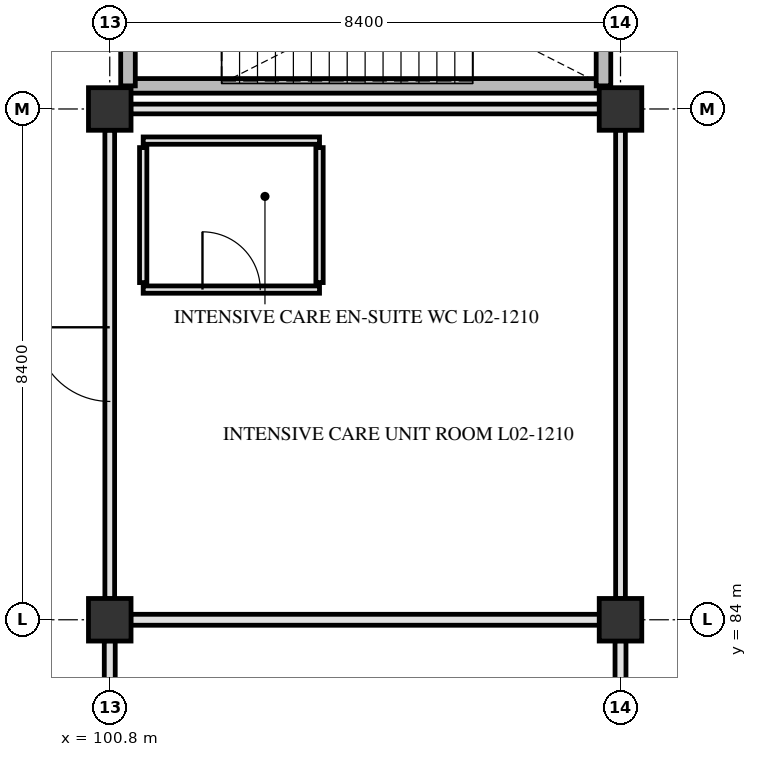
"""IFC4 building model, lengths in metres.
Left out: names, types, materials, properties, quantities, classifications, styles, units other than length and angle.
Written with IfcOpenShell. Run it as: python <this file> out.ifc"""

import sys

from ifc_helpers import new_model, si_unit, direction, frame, frame_2d, origin, origin_2d, place, context, subcontext, project, spatial, rectangle, extrude, element, fill, save


model = new_model("IFC4")
c1 = context("Model", 3, precision=1e-05, world=origin(), true_north=direction((0.0, 1.0)))
c2 = subcontext(c1, "Body", "Model", "MODEL_VIEW")
j1 = project(units=[si_unit("LENGTHUNIT", "METRE"), si_unit("PLANEANGLEUNIT", "RADIAN")], contexts=[c1])
p1 = place(None, origin())
s1 = spatial("IfcSite", under=j1, at=p1, CompositionType="ELEMENT")
p2 = place(p1, origin())
s2 = spatial("IfcBuilding", under=s1, at=p2, CompositionType="ELEMENT")
p3 = place(p2, frame((0.0, 0.0, 9.3)))
s3 = spatial("IfcBuildingStorey", under=s2, at=p3, CompositionType="ELEMENT", Elevation=9.3)
for number, where, z_axis, x_axis in (
    (1, (100.8, 84.0, 0.0), (0.0, 0.0, 1.0), (1.0, 0.0, 0.0)),
    (2, (100.8, 92.4, 0.0), (0.0, 0.0, 1.0), (1.0, 0.0, 0.0)),
    (3, (109.2, 84.0, 0.0), (0.0, 0.0, 1.0), (1.0, 0.0, 0.0)),
    (4, (109.2, 92.4, 0.0), (0.0, 0.0, 1.0), (1.0, 0.0, 0.0)),
):
    element("IfcColumn", number, at=place(p3, frame(where, z_axis=z_axis, x_axis=x_axis)), inside=s3, PredefinedType="COLUMN", context=c2, shape_type="SweptSolid", body=[
        extrude(rectangle(XDim=0.7, YDim=0.7, at=origin_2d()), origin(), (0.0, 0.0, 1.0), 5.1),
    ])
p4 = place(p3, frame((101.1, 92.78, 0.0), z_axis=(0.0, 0.0, 1.0), x_axis=(1.0, 0.0, 0.0)))
e5 = element("IfcWall", 5, at=p4, inside=s3, PredefinedType="SHEAR", context=c2, shape_type="SweptSolid", body=[
    extrude(rectangle(XDim=7.82, YDim=0.24, at=frame_2d((3.91, 0.0))), origin(), (0.0, 0.0, 1.0), 4.78),
])
for number, where, z_axis, x_axis in (
    (6, (101.1, 92.78, 0.0), (0.0, 0.0, 1.0), (0.0, 1.0, 0.0)),
    (7, (108.92, 92.78, 0.0), (0.0, 0.0, 1.0), (0.0, 1.0, 0.0)),
):
    element("IfcWall", number, at=place(p3, frame(where, z_axis=z_axis, x_axis=x_axis)), inside=s3, PredefinedType="SHEAR", context=c2, shape_type="SweptSolid", body=[
        extrude(rectangle(XDim=3.32, YDim=0.24, at=frame_2d((1.66, 0.0))), origin(), (0.0, 0.0, 1.0), 4.78),
    ])
p5 = place(p3, frame((101.145, 84.0, 0.0), z_axis=(0.0, 0.0, 1.0), x_axis=(1.0, 0.0, 0.0)))
e8 = element("IfcWall", 8, at=p5, inside=s3, PredefinedType="PARTITIONING", context=c2, shape_type="SweptSolid", body=[
    extrude(rectangle(XDim=7.71, YDim=0.18, at=frame_2d((3.855, 0.0))), origin(), (0.0, 0.0, 1.0), 4.17),
])
p6 = place(p3, frame((101.35, 89.43, 0.0), z_axis=(0.0, 0.0, 1.0), x_axis=(1.0, 0.0, 0.0)))
e9 = element("IfcWall", 9, at=p6, inside=s3, PredefinedType="PARTITIONING", context=c2, shape_type="SweptSolid", body=[
    extrude(rectangle(XDim=2.9, YDim=0.12, at=frame_2d((1.45, 0.0))), origin(), (0.0, 0.0, 1.0), 4.77),
])
p7 = place(p6, frame((0.975, 0.0, 0.0)))
e10 = element("IfcOpeningElement", 10, at=p7, cuts=e9, PredefinedType="OPENING", context=c2, shape_type="SweptSolid", body=[
    extrude(rectangle(XDim=0.95, YDim=2.1, at=frame_2d((0.475, 1.05))), frame((0.0, 0.07, 0.0), z_axis=(0.0, -1.0, 0.0), x_axis=(1.0, 0.0, 0.0)), (0.0, 0.0, 1.0), 0.14),
])
p8 = place(p3, frame((101.35, 91.88, 0.0), z_axis=(0.0, 0.0, 1.0), x_axis=(1.0, 0.0, 0.0)))
e11 = element("IfcWall", 11, at=p8, inside=s3, PredefinedType="PARTITIONING", context=c2, shape_type="SweptSolid", body=[
    extrude(rectangle(XDim=2.9, YDim=0.12, at=frame_2d((1.45, 0.0))), origin(), (0.0, 0.0, 1.0), 4.77),
])
p9 = place(p3, frame((101.145, 92.4, 0.0), z_axis=(0.0, 0.0, 1.0), x_axis=(1.0, 0.0, 0.0)))
e12 = element("IfcWall", 12, at=p9, inside=s3, PredefinedType="PARTITIONING", context=c2, shape_type="SweptSolid", body=[
    extrude(rectangle(XDim=7.71, YDim=0.16, at=frame_2d((3.855, 0.0))), origin(), (0.0, 0.0, 1.0), 4.17),
])
p10 = place(p3, frame((100.8, 78.315, 0.0), z_axis=(0.0, 0.0, 1.0), x_axis=(0.0, 1.0, 0.0)))
e13 = element("IfcWall", 13, at=p10, inside=s3, PredefinedType="PARTITIONING", context=c2, shape_type="SweptSolid", body=[
    extrude(rectangle(XDim=5.34, YDim=0.18, at=frame_2d((2.67, 0.0))), origin(), (0.0, 0.0, 1.0), 4.17),
])
p11 = place(p3, frame((100.8, 84.345, 0.0), z_axis=(0.0, 0.0, 1.0), x_axis=(0.0, 1.0, 0.0)))
e14 = element("IfcWall", 14, at=p11, inside=s3, PredefinedType="PARTITIONING", context=c2, shape_type="SweptSolid", body=[
    extrude(rectangle(XDim=7.71, YDim=0.16, at=frame_2d((3.855, 0.0))), origin(), (0.0, 0.0, 1.0), 4.17),
])
p12 = place(p11, frame((3.245, 0.0, 0.0)))
e15 = element("IfcOpeningElement", 15, at=p12, cuts=e14, PredefinedType="OPENING", context=c2, shape_type="SweptSolid", body=[
    extrude(rectangle(XDim=1.22, YDim=2.18, at=frame_2d((0.61, 1.09))), frame((0.0, 0.09, 0.0), z_axis=(0.0, -1.0, 0.0), x_axis=(1.0, 0.0, 0.0)), (0.0, 0.0, 1.0), 0.18),
])
for number, where, z_axis, x_axis in (
    (16, (101.35, 89.545, 0.0), (0.0, 0.0, 1.0), (0.0, 1.0, 0.0)),
    (17, (104.25, 89.545, 0.0), (0.0, 0.0, 1.0), (0.0, 1.0, 0.0)),
):
    element("IfcWall", number, at=place(p3, frame(where, z_axis=z_axis, x_axis=x_axis)), inside=s3, PredefinedType="PARTITIONING", context=c2, shape_type="SweptSolid", body=[
        extrude(rectangle(XDim=2.22, YDim=0.12, at=frame_2d((1.11, 0.0))), origin(), (0.0, 0.0, 1.0), 4.77),
    ])
p13 = place(p3, frame((109.2, 78.315, 0.0), z_axis=(0.0, 0.0, 1.0), x_axis=(0.0, 1.0, 0.0)))
e18 = element("IfcWall", 18, at=p13, inside=s3, PredefinedType="PARTITIONING", context=c2, shape_type="SweptSolid", body=[
    extrude(rectangle(XDim=5.34, YDim=0.18, at=frame_2d((2.67, 0.0))), origin(), (0.0, 0.0, 1.0), 4.17),
])
p14 = place(p3, frame((109.2, 84.345, 0.0), z_axis=(0.0, 0.0, 1.0), x_axis=(0.0, 1.0, 0.0)))
e19 = element("IfcWall", 19, at=p14, inside=s3, PredefinedType="PARTITIONING", context=c2, shape_type="SweptSolid", body=[
    extrude(rectangle(XDim=7.71, YDim=0.16, at=frame_2d((3.855, 0.0))), origin(), (0.0, 0.0, 1.0), 4.17),
])
p15 = place(p12, origin())
e20 = element("IfcDoor", 20, at=p15, inside=s3, OperationType="SINGLE_SWING_RIGHT", PredefinedType="DOOR", context=c2, shape_type="SweptSolid", body=[
    extrude(rectangle(XDim=1.22, YDim=2.18, at=frame_2d((0.61, 1.09))), frame((0.0, 0.025, 0.0), z_axis=(0.0, -1.0, 0.0), x_axis=(1.0, 0.0, 0.0)), (0.0, 0.0, 1.0), 0.05),
])
fill(e15, e20)
p16 = place(p7, origin())
e21 = element("IfcDoor", 21, at=p16, inside=s3, OperationType="SINGLE_SWING_LEFT", PredefinedType="DOOR", context=c2, shape_type="SweptSolid", body=[
    extrude(rectangle(XDim=0.95, YDim=2.1, at=frame_2d((0.475, 1.05))), frame((0.0, 0.025, 0.0), z_axis=(0.0, -1.0, 0.0), x_axis=(1.0, 0.0, 0.0)), (0.0, 0.0, 1.0), 0.05),
])
fill(e10, e21)
save(model, sys.argv[1])
